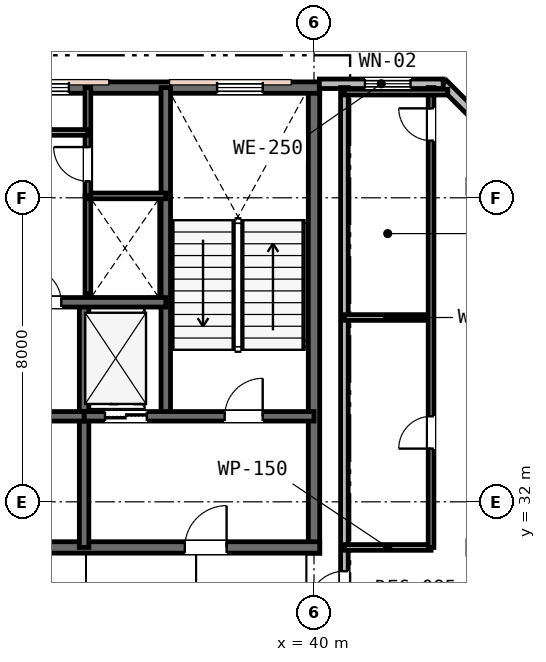
"""IFC4 building model, lengths in metres.
Left out: names, types, materials, properties, quantities, classifications, styles, units other than length and angle.
Written with IfcOpenShell. Run it as: python <this file> out.ifc"""

import sys

from ifc_helpers import new_model, si_unit, direction, frame, frame_2d, origin, place, context, subcontext, project, spatial, rectangle, extrude, element, fill, save


model = new_model("IFC4")
c1 = context("Model", 3, precision=1e-05, world=origin(), true_north=direction((0.0, 1.0)))
c2 = subcontext(c1, "Body", "Model", "MODEL_VIEW")
j1 = project(units=[si_unit("LENGTHUNIT", "METRE"), si_unit("PLANEANGLEUNIT", "RADIAN")], contexts=[c1])
p1 = place(None, origin())
s1 = spatial("IfcSite", under=j1, at=p1, CompositionType="ELEMENT")
p2 = place(p1, origin())
s2 = spatial("IfcBuilding", under=s1, at=p2, CompositionType="ELEMENT")
p3 = place(p2, frame((0.0, 0.0, 267.8)))
s3 = spatial("IfcBuildingStorey", under=s2, at=p3, CompositionType="ELEMENT", Elevation=267.8)
p4 = place(p3, frame((40.0, 30.65, 0.0), z_axis=(0.0, 0.0, 1.0), x_axis=(0.0, 1.0, 0.0)))
e1 = element("IfcWall", 1, at=p4, inside=s3, PredefinedType="SHEAR", context=c2, shape_type="SweptSolid", body=[
    extrude(rectangle(XDim=12.3, YDim=0.3, at=frame_2d((6.15, 0.0))), origin(), (0.0, 0.0, 1.0), 3.8),
])
p5 = place(p3, frame((15.85, 42.9, 0.0), z_axis=(0.0, 0.0, 1.0), x_axis=(1.0, 0.0, 0.0)))
e2 = element("IfcWall", 2, at=p5, inside=s3, PredefinedType="SHEAR", context=c2, shape_type="SweptSolid", body=[
    extrude(rectangle(XDim=24.3, YDim=0.3, at=frame_2d((12.15, 0.0))), origin(), (0.0, 0.0, 1.0), 3.8),
])
p6 = place(p5, frame((1.6, 0.0, 0.95)))
e3 = element("IfcOpeningElement", 3, at=p6, cuts=e2, PredefinedType="OPENING", context=c2, shape_type="SweptSolid", body=[
    extrude(rectangle(XDim=1.2, YDim=1.6, at=frame_2d((0.6, 0.8))), frame((0.0, 0.16, 0.0), z_axis=(0.0, -1.0, 0.0), x_axis=(1.0, 0.0, 0.0)), (0.0, 0.0, 1.0), 0.32),
])
p7 = place(p5, frame((16.5, 0.0, 0.95)))
e4 = element("IfcOpeningElement", 4, at=p7, cuts=e2, PredefinedType="OPENING", context=c2, shape_type="SweptSolid", body=[
    extrude(rectangle(XDim=1.2, YDim=1.6, at=frame_2d((0.6, 0.8))), frame((0.0, 0.16, 0.0), z_axis=(0.0, -1.0, 0.0), x_axis=(1.0, 0.0, 0.0)), (0.0, 0.0, 1.0), 0.32),
])
p8 = place(p5, frame((21.6, 0.0, 0.95)))
e5 = element("IfcOpeningElement", 5, at=p8, cuts=e2, PredefinedType="OPENING", context=c2, shape_type="SweptSolid", body=[
    extrude(rectangle(XDim=1.2, YDim=1.6, at=frame_2d((0.6, 0.8))), frame((0.0, 0.16, 0.0), z_axis=(0.0, -1.0, 0.0), x_axis=(1.0, 0.0, 0.0)), (0.0, 0.0, 1.0), 0.32),
])
p9 = place(p3, frame((28.95, 30.8, 0.0), z_axis=(0.0, 0.0, 1.0), x_axis=(1.0, 0.0, 0.0)))
e6 = element("IfcWall", 6, at=p9, inside=s3, PredefinedType="SHEAR", context=c2, shape_type="SweptSolid", body=[
    extrude(rectangle(XDim=11.2, YDim=0.3, at=frame_2d((5.6, 0.0))), origin(), (0.0, 0.0, 1.0), 3.8),
])
p10 = place(p9, frame((7.65, 0.0, 0.0)))
e7 = element("IfcOpeningElement", 7, at=p10, cuts=e6, PredefinedType="OPENING", context=c2, shape_type="SweptSolid", body=[
    extrude(rectangle(XDim=1.1, YDim=2.15, at=frame_2d((0.55, 1.075))), frame((0.0, 0.16, 0.0), z_axis=(0.0, -1.0, 0.0), x_axis=(1.0, 0.0, 0.0)), (0.0, 0.0, 1.0), 0.32),
])
p11 = place(p3, frame((36.1, 34.25, 0.0), z_axis=(0.0, 0.0, 1.0), x_axis=(0.0, 1.0, 0.0)))
e8 = element("IfcWall", 8, at=p11, inside=s3, PredefinedType="SHEAR", context=c2, shape_type="SweptSolid", body=[
    extrude(rectangle(XDim=8.65, YDim=0.25, at=frame_2d((4.325, 0.0))), origin(), (0.0, 0.0, 1.0), 3.8),
])
p12 = place(p3, frame((33.95, 30.8, 0.0), z_axis=(0.0, 0.0, 1.0), x_axis=(0.0, 1.0, 0.0)))
e9 = element("IfcWall", 9, at=p12, inside=s3, PredefinedType="SHEAR", context=c2, shape_type="SweptSolid", body=[
    extrude(rectangle(XDim=6.45, YDim=0.25, at=frame_2d((3.225, 0.0))), origin(), (0.0, 0.0, 1.0), 3.8),
])
p13 = place(p3, frame((33.95, 34.25, 0.0), z_axis=(0.0, 0.0, 1.0), x_axis=(1.0, 0.0, 0.0)))
e10 = element("IfcWall", 10, at=p13, inside=s3, PredefinedType="SHEAR", context=c2, shape_type="SweptSolid", body=[
    extrude(rectangle(XDim=6.05, YDim=0.25, at=frame_2d((3.025, 0.0))), origin(), (0.0, 0.0, 1.0), 3.8),
])
p14 = place(p13, frame((3.7, 0.0, 0.0)))
e11 = element("IfcOpeningElement", 11, at=p14, cuts=e10, PredefinedType="OPENING", context=c2, shape_type="SweptSolid", body=[
    extrude(rectangle(XDim=1.0, YDim=2.15, at=frame_2d((0.5, 1.075))), frame((0.0, 0.135, 0.0), z_axis=(0.0, -1.0, 0.0), x_axis=(1.0, 0.0, 0.0)), (0.0, 0.0, 1.0), 0.27),
])
p15 = place(p13, frame((0.55, 0.0, 0.0)))
e12 = element("IfcOpeningElement", 12, at=p15, cuts=e10, PredefinedType="OPENING", context=c2, shape_type="SweptSolid", body=[
    extrude(rectangle(XDim=1.1, YDim=2.15, at=frame_2d((0.55, 1.075))), frame((0.0, 0.135, 0.0), z_axis=(0.0, -1.0, 0.0), x_axis=(1.0, 0.0, 0.0)), (0.0, 0.0, 1.0), 0.27),
])
p16 = place(p3, frame((28.95, 34.25, 0.0), z_axis=(0.0, 0.0, 1.0), x_axis=(1.0, 0.0, 0.0)))
e13 = element("IfcWall", 13, at=p16, inside=s3, PredefinedType="SHEAR", context=c2, shape_type="SweptSolid", body=[
    extrude(rectangle(XDim=5.0, YDim=0.25, at=frame_2d((2.5, 0.0))), origin(), (0.0, 0.0, 1.0), 3.8),
])
p17 = place(p16, frame((1.95, 0.0, 0.0)))
e14 = element("IfcOpeningElement", 14, at=p17, cuts=e13, PredefinedType="OPENING", context=c2, shape_type="SweptSolid", body=[
    extrude(rectangle(XDim=1.0, YDim=2.15, at=frame_2d((0.5, 1.075))), frame((0.0, 0.135, 0.0), z_axis=(0.0, -1.0, 0.0), x_axis=(1.0, 0.0, 0.0)), (0.0, 0.0, 1.0), 0.27),
])
p18 = place(p3, frame((19.9, 37.25, 0.0), z_axis=(0.0, 0.0, 1.0), x_axis=(1.0, 0.0, 0.0)))
e15 = element("IfcWall", 15, at=p18, inside=s3, PredefinedType="SHEAR", context=c2, shape_type="SweptSolid", body=[
    extrude(rectangle(XDim=16.2, YDim=0.25, at=frame_2d((8.1, 0.0))), origin(), (0.0, 0.0, 1.0), 3.8),
])
p19 = place(p18, frame((12.55, 0.0, 0.0)))
e16 = element("IfcOpeningElement", 16, at=p19, cuts=e15, PredefinedType="OPENING", context=c2, shape_type="SweptSolid", body=[
    extrude(rectangle(XDim=0.9, YDim=2.15, at=frame_2d((0.45, 1.075))), frame((0.0, 0.135, 0.0), z_axis=(0.0, -1.0, 0.0), x_axis=(1.0, 0.0, 0.0)), (0.0, 0.0, 1.0), 0.27),
])
p20 = place(p18, frame((2.5, 0.0, 0.0)))
e17 = element("IfcOpeningElement", 17, at=p20, cuts=e15, PredefinedType="OPENING", context=c2, shape_type="SweptSolid", body=[
    extrude(rectangle(XDim=1.05, YDim=2.15, at=frame_2d((0.525, 1.075))), frame((0.0, 0.135, 0.0), z_axis=(0.0, -1.0, 0.0), x_axis=(1.0, 0.0, 0.0)), (0.0, 0.0, 1.0), 0.27),
])
p21 = place(p18, frame((4.4, 0.0, 0.0)))
e18 = element("IfcOpeningElement", 18, at=p21, cuts=e15, PredefinedType="OPENING", context=c2, shape_type="SweptSolid", body=[
    extrude(rectangle(XDim=1.05, YDim=2.15, at=frame_2d((0.525, 1.075))), frame((0.0, 0.135, 0.0), z_axis=(0.0, -1.0, 0.0), x_axis=(1.0, 0.0, 0.0)), (0.0, 0.0, 1.0), 0.27),
])
p22 = place(p18, frame((6.3, 0.0, 0.0)))
e19 = element("IfcOpeningElement", 19, at=p22, cuts=e15, PredefinedType="OPENING", context=c2, shape_type="SweptSolid", body=[
    extrude(rectangle(XDim=1.05, YDim=2.15, at=frame_2d((0.525, 1.075))), frame((0.0, 0.135, 0.0), z_axis=(0.0, -1.0, 0.0), x_axis=(1.0, 0.0, 0.0)), (0.0, 0.0, 1.0), 0.27),
])
p23 = place(p3, frame((46.0, 40.4, 0.0), z_axis=(0.0, 0.0, 1.0), x_axis=(-0.707106781187, 0.707106781187, 0.0)))
e20 = element("IfcWall", 20, at=p23, inside=s3, PredefinedType="STANDARD", context=c2, shape_type="SweptSolid", body=[
    extrude(rectangle(XDim=3.677, YDim=0.25, at=frame_2d((1.839, 0.0))), origin(), (0.0, 0.0, 1.0), 3.53),
])
p24 = place(p23, frame((0.828, 0.0, 0.75)))
e21 = element("IfcOpeningElement", 21, at=p24, cuts=e20, PredefinedType="OPENING", context=c2, shape_type="SweptSolid", body=[
    extrude(rectangle(XDim=1.8, YDim=1.85, at=frame_2d((0.9, 0.925))), frame((0.0, 0.135, 0.0), z_axis=(0.0, -1.0, 0.0), x_axis=(1.0, 0.0, 0.0)), (0.0, 0.0, 1.0), 0.27),
])
p25 = place(p3, frame((43.4, 43.0, 0.0), z_axis=(0.0, 0.0, 1.0), x_axis=(-1.0, 0.0, 0.0)))
e22 = element("IfcWall", 22, at=p25, inside=s3, PredefinedType="STANDARD", context=c2, shape_type="SweptSolid", body=[
    extrude(rectangle(XDim=3.26, YDim=0.25, at=frame_2d((1.63, 0.0))), origin(), (0.0, 0.0, 1.0), 3.53),
])
p26 = place(p25, frame((0.86, 0.0, 0.85)))
e23 = element("IfcOpeningElement", 23, at=p26, cuts=e22, PredefinedType="OPENING", context=c2, shape_type="SweptSolid", body=[
    extrude(rectangle(XDim=1.2, YDim=1.6, at=frame_2d((0.6, 0.8))), frame((0.0, 0.135, 0.0), z_axis=(0.0, -1.0, 0.0), x_axis=(1.0, 0.0, 0.0)), (0.0, 0.0, 1.0), 0.27),
])
p27 = place(p3, frame((34.05, 37.473, 0.0), z_axis=(0.0, 0.0, 1.0), x_axis=(0.0, 1.0, 0.0)))
e24 = element("IfcWall", 24, at=p27, inside=s3, PredefinedType="PLUMBINGWALL", context=c2, shape_type="SweptSolid", body=[
    extrude(rectangle(XDim=2.577, YDim=0.15, at=frame_2d((1.288, 0.0))), origin(), (0.0, 0.0, 1.0), 3.53),
])
p28 = place(p3, frame((34.05, 40.05, 0.0), z_axis=(0.0, 0.0, 1.0), x_axis=(1.0, 0.0, 0.0)))
e25 = element("IfcWall", 25, at=p28, inside=s3, PredefinedType="PARTITIONING", context=c2, shape_type="SweptSolid", body=[
    extrude(rectangle(XDim=2.05, YDim=0.15, at=frame_2d((1.025, 0.0))), origin(), (0.0, 0.0, 1.0), 3.53),
])
p29 = place(p3, frame((34.05, 40.05, 0.0), z_axis=(0.0, 0.0, 1.0), x_axis=(0.0, 1.0, 0.0)))
e26 = element("IfcWall", 26, at=p29, inside=s3, PredefinedType="PARTITIONING", context=c2, shape_type="SweptSolid", body=[
    extrude(rectangle(XDim=2.85, YDim=0.15, at=frame_2d((1.425, 0.0))), origin(), (0.0, 0.0, 1.0), 3.53),
])
p30 = place(p29, frame((0.385, 0.0, 0.0)))
e27 = element("IfcOpeningElement", 27, at=p30, cuts=e26, PredefinedType="OPENING", context=c2, shape_type="SweptSolid", body=[
    extrude(rectangle(XDim=0.9, YDim=2.15, at=frame_2d((0.45, 1.075))), frame((0.0, 0.085, 0.0), z_axis=(0.0, -1.0, 0.0), x_axis=(1.0, 0.0, 0.0)), (0.0, 0.0, 1.0), 0.17),
])
p31 = place(p3, frame((22.08, 41.72, 0.0), z_axis=(0.0, 0.0, 1.0), x_axis=(1.0, 0.0, 0.0)))
e28 = element("IfcWall", 28, at=p31, inside=s3, PredefinedType="PARTITIONING", context=c2, shape_type="SweptSolid", body=[
    extrude(rectangle(XDim=11.97, YDim=0.15, at=frame_2d((5.985, 0.0))), origin(), (0.0, 0.0, 1.0), 3.53),
])
p32 = place(p31, frame((5.535, 0.0, 0.0)))
e29 = element("IfcOpeningElement", 29, at=p32, cuts=e28, PredefinedType="OPENING", context=c2, shape_type="SweptSolid", body=[
    extrude(rectangle(XDim=0.9, YDim=2.15, at=frame_2d((0.45, 1.075))), frame((0.0, 0.085, 0.0), z_axis=(0.0, -1.0, 0.0), x_axis=(1.0, 0.0, 0.0)), (0.0, 0.0, 1.0), 0.17),
])
p33 = place(p3, frame((40.8, 28.6, 0.0), z_axis=(0.0, 0.0, 1.0), x_axis=(0.0, 1.0, 0.0)))
e30 = element("IfcWall", 30, at=p33, inside=s3, PredefinedType="PARTITIONING", context=c2, shape_type="SweptSolid", body=[
    extrude(rectangle(XDim=14.3, YDim=0.2, at=frame_2d((7.15, 0.0))), origin(), (0.0, 0.0, 1.0), 3.16),
])
p34 = place(p33, frame((0.625, 0.0, 0.0)))
e31 = element("IfcOpeningElement", 31, at=p34, cuts=e30, PredefinedType="OPENING", context=c2, shape_type="SweptSolid", body=[
    extrude(rectangle(XDim=0.95, YDim=2.15, at=frame_2d((0.475, 1.075))), frame((0.0, 0.11, 0.0), z_axis=(0.0, -1.0, 0.0), x_axis=(1.0, 0.0, 0.0)), (0.0, 0.0, 1.0), 0.22),
])
p35 = place(p3, frame((40.8, 30.8, 0.0), z_axis=(0.0, 0.0, 1.0), x_axis=(1.0, 0.0, 0.0)))
e32 = element("IfcWall", 32, at=p35, inside=s3, PredefinedType="PARTITIONING", context=c2, shape_type="SweptSolid", body=[
    extrude(rectangle(XDim=2.28, YDim=0.15, at=frame_2d((1.14, 0.0))), origin(), (0.0, 0.0, 1.0), 3.16),
])
p36 = place(p3, frame((40.8, 36.85, 0.0), z_axis=(0.0, 0.0, 1.0), x_axis=(1.0, 0.0, 0.0)))
e33 = element("IfcWall", 33, at=p36, inside=s3, PredefinedType="PARTITIONING", context=c2, shape_type="SweptSolid", body=[
    extrude(rectangle(XDim=2.28, YDim=0.15, at=frame_2d((1.14, 0.0))), origin(), (0.0, 0.0, 1.0), 3.53),
])
p37 = place(p3, frame((43.08, 30.8, 0.0), z_axis=(0.0, 0.0, 1.0), x_axis=(0.0, 1.0, 0.0)))
e34 = element("IfcWall", 34, at=p37, inside=s3, PredefinedType="PARTITIONING", context=c2, shape_type="SweptSolid", body=[
    extrude(rectangle(XDim=12.1, YDim=0.15, at=frame_2d((6.05, 0.0))), origin(), (0.0, 0.0, 1.0), 3.16),
])
p38 = place(p37, frame((2.6, 0.0, 0.0)))
e35 = element("IfcOpeningElement", 35, at=p38, cuts=e34, PredefinedType="OPENING", context=c2, shape_type="SweptSolid", body=[
    extrude(rectangle(XDim=0.85, YDim=2.15, at=frame_2d((0.425, 1.075))), frame((0.0, 0.085, 0.0), z_axis=(0.0, -1.0, 0.0), x_axis=(1.0, 0.0, 0.0)), (0.0, 0.0, 1.0), 0.17),
])
p39 = place(p37, frame((10.704, 0.0, 0.0)))
e36 = element("IfcOpeningElement", 36, at=p39, cuts=e34, PredefinedType="OPENING", context=c2, shape_type="SweptSolid", body=[
    extrude(rectangle(XDim=0.85, YDim=2.15, at=frame_2d((0.425, 1.075))), frame((0.0, 0.085, 0.0), z_axis=(0.0, -1.0, 0.0), x_axis=(1.0, 0.0, 0.0)), (0.0, 0.0, 1.0), 0.17),
])
p40 = place(p3, frame((40.8, 42.78, 0.0), z_axis=(0.0, 0.0, 1.0), x_axis=(1.0, 0.0, 0.0)))
e37 = element("IfcWall", 37, at=p40, inside=s3, PredefinedType="PARTITIONING", context=c2, shape_type="SweptSolid", body=[
    extrude(rectangle(XDim=2.72, YDim=0.15, at=frame_2d((1.36, 0.0))), origin(), (0.0, 0.0, 1.0), 3.53),
])
p41 = place(p7, origin())
e38 = element("IfcWindow", 38, at=p41, inside=s3, PartitioningType="SINGLE_PANEL", PredefinedType="WINDOW", context=c2, shape_type="SweptSolid", body=[
    extrude(rectangle(XDim=1.2, YDim=1.6, at=frame_2d((0.6, 0.8))), frame((0.0, 0.03, 0.0), z_axis=(0.0, -1.0, 0.0), x_axis=(1.0, 0.0, 0.0)), (0.0, 0.0, 1.0), 0.06),
])
fill(e4, e38)
p42 = place(p8, origin())
e39 = element("IfcWindow", 39, at=p42, inside=s3, PartitioningType="SINGLE_PANEL", PredefinedType="WINDOW", context=c2, shape_type="SweptSolid", body=[
    extrude(rectangle(XDim=1.2, YDim=1.6, at=frame_2d((0.6, 0.8))), frame((0.0, 0.03, 0.0), z_axis=(0.0, -1.0, 0.0), x_axis=(1.0, 0.0, 0.0)), (0.0, 0.0, 1.0), 0.06),
])
fill(e5, e39)
p43 = place(p26, origin())
e40 = element("IfcWindow", 40, at=p43, inside=s3, PartitioningType="SINGLE_PANEL", PredefinedType="WINDOW", context=c2, shape_type="SweptSolid", body=[
    extrude(rectangle(XDim=1.2, YDim=1.6, at=frame_2d((0.6, 0.8))), frame((0.0, 0.03, 0.0), z_axis=(0.0, -1.0, 0.0), x_axis=(1.0, 0.0, 0.0)), (0.0, 0.0, 1.0), 0.06),
])
fill(e23, e40)
p44 = place(p14, origin())
e41 = element("IfcDoor", 41, at=p44, inside=s3, OperationType="SINGLE_SWING_RIGHT", PredefinedType="DOOR", context=c2, shape_type="SweptSolid", body=[
    extrude(rectangle(XDim=1.0, YDim=2.15, at=frame_2d((0.5, 1.075))), frame((0.0, 0.025, 0.0), z_axis=(0.0, -1.0, 0.0), x_axis=(1.0, 0.0, 0.0)), (0.0, 0.0, 1.0), 0.05),
])
fill(e11, e41)
p45 = place(p10, origin())
e42 = element("IfcDoor", 42, at=p45, inside=s3, OperationType="SINGLE_SWING_RIGHT", PredefinedType="DOOR", context=c2, shape_type="SweptSolid", body=[
    extrude(rectangle(XDim=1.1, YDim=2.15, at=frame_2d((0.55, 1.075))), frame((0.0, 0.025, 0.0), z_axis=(0.0, -1.0, 0.0), x_axis=(1.0, 0.0, 0.0)), (0.0, 0.0, 1.0), 0.05),
])
fill(e7, e42)
p46 = place(p19, origin())
e43 = element("IfcDoor", 43, at=p46, inside=s3, OperationType="SINGLE_SWING_LEFT", PredefinedType="DOOR", context=c2, shape_type="SweptSolid", body=[
    extrude(rectangle(XDim=0.9, YDim=2.15, at=frame_2d((0.45, 1.075))), frame((0.0, 0.025, 0.0), z_axis=(0.0, -1.0, 0.0), x_axis=(1.0, 0.0, 0.0)), (0.0, 0.0, 1.0), 0.05),
])
fill(e16, e43)
p47 = place(p30, origin())
e44 = element("IfcDoor", 44, at=p47, inside=s3, OperationType="SINGLE_SWING_RIGHT", PredefinedType="DOOR", context=c2, shape_type="SweptSolid", body=[
    extrude(rectangle(XDim=0.9, YDim=2.15, at=frame_2d((0.45, 1.075))), frame((0.0, 0.025, 0.0), z_axis=(0.0, -1.0, 0.0), x_axis=(1.0, 0.0, 0.0)), (0.0, 0.0, 1.0), 0.05),
])
fill(e27, e44)
p48 = place(p34, origin())
e45 = element("IfcDoor", 45, at=p48, inside=s3, OperationType="SINGLE_SWING_LEFT", PredefinedType="DOOR", context=c2, shape_type="SweptSolid", body=[
    extrude(rectangle(XDim=0.95, YDim=2.15, at=frame_2d((0.475, 1.075))), frame((0.0, 0.025, 0.0), z_axis=(0.0, -1.0, 0.0), x_axis=(1.0, 0.0, 0.0)), (0.0, 0.0, 1.0), 0.05),
])
fill(e31, e45)
p49 = place(p38, origin())
e46 = element("IfcDoor", 46, at=p49, inside=s3, OperationType="SINGLE_SWING_LEFT", PredefinedType="DOOR", context=c2, shape_type="SweptSolid", body=[
    extrude(rectangle(XDim=0.85, YDim=2.15, at=frame_2d((0.425, 1.075))), frame((0.0, 0.025, 0.0), z_axis=(0.0, -1.0, 0.0), x_axis=(1.0, 0.0, 0.0)), (0.0, 0.0, 1.0), 0.05),
])
fill(e35, e46)
p50 = place(p39, origin())
e47 = element("IfcDoor", 47, at=p50, inside=s3, OperationType="SINGLE_SWING_RIGHT", PredefinedType="DOOR", context=c2, shape_type="SweptSolid", body=[
    extrude(rectangle(XDim=0.85, YDim=2.15, at=frame_2d((0.425, 1.075))), frame((0.0, 0.025, 0.0), z_axis=(0.0, -1.0, 0.0), x_axis=(1.0, 0.0, 0.0)), (0.0, 0.0, 1.0), 0.05),
])
fill(e36, e47)
p51 = place(p15, origin())
e48 = element("IfcDoor", 48, at=p51, inside=s3, OperationType="DOUBLE_DOOR_SLIDING", PredefinedType="DOOR", context=c2, shape_type="SweptSolid", body=[
    extrude(rectangle(XDim=1.1, YDim=2.15, at=frame_2d((0.55, 1.075))), frame((0.0, 0.025, 0.0), z_axis=(0.0, -1.0, 0.0), x_axis=(1.0, 0.0, 0.0)), (0.0, 0.0, 1.0), 0.05),
])
fill(e12, e48)
save(model, sys.argv[1])
